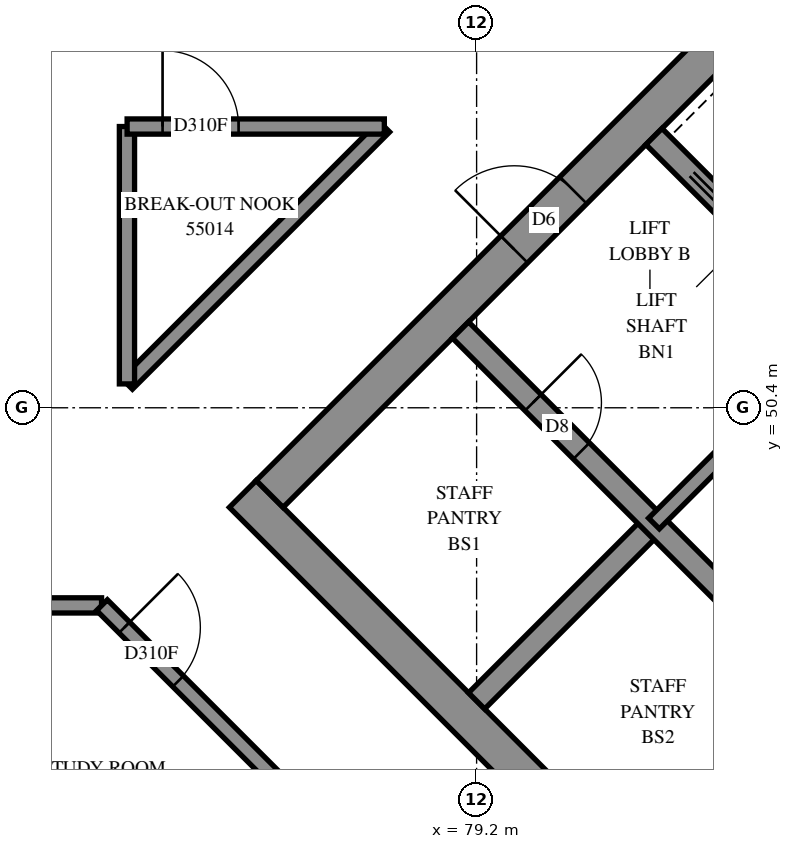
"""IFC4 building model, lengths in metres.
Left out: names, types, materials, properties, quantities, classifications, styles, units other than length and angle.
Written with IfcOpenShell. Run it as: python <this file> out.ifc"""

import sys

from ifc_helpers import new_model, si_unit, direction, frame, frame_2d, origin, place, context, subcontext, project, spatial, rectangle, extrude, element, fill, save


model = new_model("IFC4")
c1 = context("Model", 3, precision=1e-05, world=origin(), true_north=direction((0.0, 1.0)))
c2 = subcontext(c1, "Body", "Model", "MODEL_VIEW")
j1 = project(units=[si_unit("LENGTHUNIT", "METRE"), si_unit("PLANEANGLEUNIT", "RADIAN")], contexts=[c1])
p1 = place(None, origin())
s1 = spatial("IfcSite", under=j1, at=p1, CompositionType="ELEMENT")
p2 = place(p1, origin())
s2 = spatial("IfcBuilding", under=s1, at=p2, CompositionType="ELEMENT")
p3 = place(p2, frame((0.0, 0.0, 203.2)))
s3 = spatial("IfcBuildingStorey", under=s2, at=p3, CompositionType="ELEMENT", Elevation=203.2)
p4 = place(p3, frame((76.124, 49.267, -0.3), z_axis=(0.0, 0.0, 1.0), x_axis=(0.7071067812, -0.7071067812, 0.0)))
e1 = element("IfcWall", 1, at=p4, inside=s3, PredefinedType="SHEAR", context=c2, shape_type="SweptSolid", body=[
    extrude(rectangle(XDim=15.4, YDim=0.5, at=frame_2d((7.7, 0.0))), origin(), (0.0, 0.0, 1.0), 2.7),
])
p5 = place(p3, frame((76.478, 49.267, -0.3), z_axis=(0.0, 0.0, 1.0), x_axis=(0.7071067812, 0.7071067812, 0.0)))
e2 = element("IfcWall", 2, at=p5, inside=s3, PredefinedType="SHEAR", context=c2, shape_type="SweptSolid", body=[
    extrude(rectangle(XDim=14.4, YDim=0.5, at=frame_2d((7.2, 0.0))), origin(), (0.0, 0.0, 1.0), 2.7),
])
p6 = place(p5, frame((4.55, 0.0, 0.3)))
e3 = element("IfcOpeningElement", 3, at=p6, cuts=e2, PredefinedType="OPENING", context=c2, shape_type="SweptSolid", body=[
    extrude(rectangle(XDim=1.1, YDim=2.1, at=frame_2d((0.55, 1.05))), frame((0.0, 0.26, 0.0), z_axis=(0.0, -1.0, 0.0), x_axis=(1.0, 0.0, 0.0)), (0.0, 0.0, 1.0), 0.52),
])
p7 = place(p5, frame((11.35, 0.0, 0.3)))
e4 = element("IfcOpeningElement", 4, at=p7, cuts=e2, PredefinedType="OPENING", context=c2, shape_type="SweptSolid", body=[
    extrude(rectangle(XDim=1.1, YDim=2.1, at=frame_2d((0.55, 1.05))), frame((0.0, 0.26, 0.0), z_axis=(0.0, -1.0, 0.0), x_axis=(1.0, 0.0, 0.0)), (0.0, 0.0, 1.0), 0.52),
])
p8 = place(p3, frame((79.2, 46.544, 0.0), z_axis=(0.0, 0.0, 1.0), x_axis=(0.7071219326, 0.7070916295, 0.0)))
e5 = element("IfcWall", 5, at=p8, inside=s3, PredefinedType="SOLIDWALL", context=c2, shape_type="SweptSolid", body=[
    extrude(rectangle(XDim=3.3, YDim=0.3, at=frame_2d((1.65, 0.0))), origin(), (0.0, 0.0, 1.0), 3.1),
])
p9 = place(p3, frame((81.746, 43.999, 0.0), z_axis=(0.0, 0.0, 1.0), x_axis=(0.7071067812, 0.7071067812, 0.0)))
e6 = element("IfcWall", 6, at=p9, inside=s3, PredefinedType="SOLIDWALL", context=c2, shape_type="SweptSolid", body=[
    extrude(rectangle(XDim=3.3, YDim=0.3, at=frame_2d((1.65, 0.0))), origin(), (0.0, 0.0, 1.0), 3.1),
])
p10 = place(p3, frame((78.988, 51.423, 0.0), z_axis=(0.0, 0.0, 1.0), x_axis=(0.7071067812, -0.7071067812, 0.0)))
e7 = element("IfcWall", 7, at=p10, inside=s3, PredefinedType="SOLIDWALL", context=c2, shape_type="SweptSolid", body=[
    extrude(rectangle(XDim=14.4, YDim=0.3, at=frame_2d((7.2, 0.0))), origin(), (0.0, 0.0, 1.0), 3.1),
])
p11 = place(p10, frame((1.35, 0.0, 0.0)))
e8 = element("IfcOpeningElement", 8, at=p11, cuts=e7, PredefinedType="OPENING", context=c2, shape_type="SweptSolid", body=[
    extrude(rectangle(XDim=0.9, YDim=2.1, at=frame_2d((0.45, 1.05))), frame((0.0, 0.16, 0.0), z_axis=(0.0, -1.0, 0.0), x_axis=(1.0, 0.0, 0.0)), (0.0, 0.0, 1.0), 0.32),
])
p12 = place(p10, frame((4.95, 0.0, 0.0)))
e9 = element("IfcOpeningElement", 9, at=p12, cuts=e7, PredefinedType="OPENING", context=c2, shape_type="SweptSolid", body=[
    extrude(rectangle(XDim=0.9, YDim=2.1, at=frame_2d((0.45, 1.05))), frame((0.0, 0.16, 0.0), z_axis=(0.0, -1.0, 0.0), x_axis=(1.0, 0.0, 0.0)), (0.0, 0.0, 1.0), 0.32),
])
p13 = place(p10, frame((8.55, 0.0, 0.0)))
e10 = element("IfcOpeningElement", 10, at=p13, cuts=e7, PredefinedType="OPENING", context=c2, shape_type="SweptSolid", body=[
    extrude(rectangle(XDim=0.9, YDim=2.1, at=frame_2d((0.45, 1.05))), frame((0.0, 0.16, 0.0), z_axis=(0.0, -1.0, 0.0), x_axis=(1.0, 0.0, 0.0)), (0.0, 0.0, 1.0), 0.32),
])
p14 = place(p10, frame((12.05, 0.0, 0.0)))
e11 = element("IfcOpeningElement", 11, at=p14, cuts=e7, PredefinedType="OPENING", context=c2, shape_type="SweptSolid", body=[
    extrude(rectangle(XDim=1.1, YDim=2.1, at=frame_2d((0.55, 1.05))), frame((0.0, 0.16, 0.0), z_axis=(0.0, -1.0, 0.0), x_axis=(1.0, 0.0, 0.0)), (0.0, 0.0, 1.0), 0.32),
])
p15 = place(p3, frame((81.534, 53.969, 0.0), z_axis=(0.0, 0.0, 1.0), x_axis=(0.707103309, -0.7071102534, 0.0)))
e12 = element("IfcWall", 12, at=p15, inside=s3, PredefinedType="SOLIDWALL", context=c2, shape_type="SweptSolid", body=[
    extrude(rectangle(XDim=14.4, YDim=0.3, at=frame_2d((7.2, 0.0))), origin(), (0.0, 0.0, 1.0), 3.1),
])
p16 = place(p15, frame((1.25, 0.0, 0.0)))
e13 = element("IfcOpeningElement", 13, at=p16, cuts=e12, PredefinedType="OPENING", context=c2, shape_type="SweptSolid", body=[
    extrude(rectangle(XDim=1.1, YDim=2.1, at=frame_2d((0.55, 1.05))), frame((0.0, 0.16, 0.0), z_axis=(0.0, -1.0, 0.0), x_axis=(1.0, 0.0, 0.0)), (0.0, 0.0, 1.0), 0.32),
])
p17 = place(p15, frame((4.85, 0.0, 0.0)))
e14 = element("IfcOpeningElement", 14, at=p17, cuts=e12, PredefinedType="OPENING", context=c2, shape_type="SweptSolid", body=[
    extrude(rectangle(XDim=1.1, YDim=2.1, at=frame_2d((0.55, 1.05))), frame((0.0, 0.16, 0.0), z_axis=(0.0, -1.0, 0.0), x_axis=(1.0, 0.0, 0.0)), (0.0, 0.0, 1.0), 0.32),
])
p18 = place(p15, frame((8.45, 0.0, 0.0)))
e15 = element("IfcOpeningElement", 15, at=p18, cuts=e12, PredefinedType="OPENING", context=c2, shape_type="SweptSolid", body=[
    extrude(rectangle(XDim=1.1, YDim=2.1, at=frame_2d((0.55, 1.05))), frame((0.0, 0.16, 0.0), z_axis=(0.0, -1.0, 0.0), x_axis=(1.0, 0.0, 0.0)), (0.0, 0.0, 1.0), 0.32),
])
p19 = place(p15, frame((12.05, 0.0, 0.0)))
e16 = element("IfcOpeningElement", 16, at=p19, cuts=e12, PredefinedType="OPENING", context=c2, shape_type="SweptSolid", body=[
    extrude(rectangle(XDim=1.1, YDim=2.1, at=frame_2d((0.55, 1.05))), frame((0.0, 0.16, 0.0), z_axis=(0.0, -1.0, 0.0), x_axis=(1.0, 0.0, 0.0)), (0.0, 0.0, 1.0), 0.32),
])
p20 = place(p3, frame((81.534, 48.878, 0.0), z_axis=(0.0, 0.0, 1.0), x_axis=(0.707092892, 0.7071206701, 0.0)))
e17 = element("IfcWall", 17, at=p20, inside=s3, PredefinedType="PARTITIONING", context=c2, shape_type="SweptSolid", body=[
    extrude(rectangle(XDim=3.6, YDim=0.2, at=frame_2d((1.8, 0.0))), origin(), (0.0, 0.0, 1.0), 3.1),
])
p21 = place(p3, frame((55.0, 47.8, 0.0), z_axis=(0.0, 0.0, 1.0), x_axis=(1.0, 0.0, 0.0)))
e18 = element("IfcWall", 18, at=p21, inside=s3, PredefinedType="PARTITIONING", context=c2, shape_type="SweptSolid", body=[
    extrude(rectangle(XDim=19.266, YDim=0.2, at=frame_2d((9.633, 0.0))), origin(), (0.0, 0.0, 1.0), 3.1),
])
p22 = place(p21, frame((4.9, 0.0, 0.0)))
e19 = element("IfcOpeningElement", 19, at=p22, cuts=e18, PredefinedType="OPENING", context=c2, shape_type="SweptSolid", body=[
    extrude(rectangle(XDim=0.9, YDim=2.1, at=frame_2d((0.45, 1.05))), frame((0.0, 0.11, 0.0), z_axis=(0.0, -1.0, 0.0), x_axis=(1.0, 0.0, 0.0)), (0.0, 0.0, 1.0), 0.22),
])
p23 = place(p21, frame((6.6, 0.0, 0.0)))
e20 = element("IfcOpeningElement", 20, at=p23, cuts=e18, PredefinedType="OPENING", context=c2, shape_type="SweptSolid", body=[
    extrude(rectangle(XDim=0.9, YDim=2.1, at=frame_2d((0.45, 1.05))), frame((0.0, 0.11, 0.0), z_axis=(0.0, -1.0, 0.0), x_axis=(1.0, 0.0, 0.0)), (0.0, 0.0, 1.0), 0.22),
])
p24 = place(p21, frame((13.743, 0.0, 0.0)))
e21 = element("IfcOpeningElement", 21, at=p24, cuts=e18, PredefinedType="OPENING", context=c2, shape_type="SweptSolid", body=[
    extrude(rectangle(XDim=0.9, YDim=2.1, at=frame_2d((0.45, 1.05))), frame((0.0, 0.11, 0.0), z_axis=(0.0, -1.0, 0.0), x_axis=(1.0, 0.0, 0.0)), (0.0, 0.0, 1.0), 0.22),
])
p25 = place(p3, frame((74.601, 50.715, 0.0), z_axis=(0.0, 0.0, 1.0), x_axis=(0.7071067812, 0.7071067812, 0.0)))
e22 = element("IfcWall", 22, at=p25, inside=s3, PredefinedType="PARTITIONING", context=c2, shape_type="SweptSolid", body=[
    extrude(rectangle(XDim=4.786, YDim=0.2, at=frame_2d((2.393, 0.0))), origin(), (0.0, 0.0, 1.0), 3.1),
])
p26 = place(p3, frame((74.272, 47.803, 0.0), z_axis=(0.0, 0.0, 1.0), x_axis=(0.7071067812, -0.7071067812, 0.0)))
e23 = element("IfcWall", 23, at=p26, inside=s3, PredefinedType="PARTITIONING", context=c2, shape_type="SweptSolid", body=[
    extrude(rectangle(XDim=4.641, YDim=0.2, at=frame_2d((2.321, 0.0))), origin(), (0.0, 0.0, 1.0), 3.1),
])
p27 = place(p26, frame((0.416, 0.0, 0.0)))
e24 = element("IfcOpeningElement", 24, at=p27, cuts=e23, PredefinedType="OPENING", context=c2, shape_type="SweptSolid", body=[
    extrude(rectangle(XDim=1.0, YDim=2.1, at=frame_2d((0.5, 1.05))), frame((0.0, 0.11, 0.0), z_axis=(0.0, -1.0, 0.0), x_axis=(1.0, 0.0, 0.0)), (0.0, 0.0, 1.0), 0.22),
])
p28 = place(p3, frame((74.6, 50.714, 0.0), z_axis=(0.0, 0.0, 1.0), x_axis=(0.0, 1.0, 0.0)))
e25 = element("IfcWall", 25, at=p28, inside=s3, PredefinedType="PARTITIONING", context=c2, shape_type="SweptSolid", body=[
    extrude(rectangle(XDim=3.386, YDim=0.2, at=frame_2d((1.693, 0.0))), origin(), (0.0, 0.0, 1.0), 3.1),
])
p29 = place(p3, frame((74.602, 54.1, 0.0), z_axis=(0.0, 0.0, 1.0), x_axis=(1.0, 0.0, 0.0)))
e26 = element("IfcWall", 26, at=p29, inside=s3, PredefinedType="PARTITIONING", context=c2, shape_type="SweptSolid", body=[
    extrude(rectangle(XDim=3.384, YDim=0.2, at=frame_2d((1.692, 0.0))), origin(), (0.0, 0.0, 1.0), 3.1),
])
p30 = place(p29, frame((0.467, 0.0, 0.0)))
e27 = element("IfcOpeningElement", 27, at=p30, cuts=e26, PredefinedType="OPENING", context=c2, shape_type="SweptSolid", body=[
    extrude(rectangle(XDim=1.0, YDim=2.1, at=frame_2d((0.5, 1.05))), frame((0.0, 0.11, 0.0), z_axis=(0.0, -1.0, 0.0), x_axis=(1.0, 0.0, 0.0)), (0.0, 0.0, 1.0), 0.22),
])
p31 = place(p6, origin())
e28 = element("IfcDoor", 28, at=p31, inside=s3, OperationType="DOUBLE_DOOR_SINGLE_SWING", PredefinedType="DOOR", context=c2, shape_type="SweptSolid", body=[
    extrude(rectangle(XDim=1.1, YDim=2.1, at=frame_2d((0.55, 1.05))), frame((0.0, 0.025, 0.0), z_axis=(0.0, -1.0, 0.0), x_axis=(1.0, 0.0, 0.0)), (0.0, 0.0, 1.0), 0.05),
])
fill(e3, e28)
p32 = place(p11, origin())
e29 = element("IfcDoor", 29, at=p32, inside=s3, OperationType="SINGLE_SWING_LEFT", PredefinedType="DOOR", context=c2, shape_type="SweptSolid", body=[
    extrude(rectangle(XDim=0.9, YDim=2.1, at=frame_2d((0.45, 1.05))), frame((0.0, 0.025, 0.0), z_axis=(0.0, -1.0, 0.0), x_axis=(1.0, 0.0, 0.0)), (0.0, 0.0, 1.0), 0.05),
])
fill(e8, e29)
p33 = place(p30, origin())
e30 = element("IfcDoor", 30, at=p33, inside=s3, OperationType="SINGLE_SWING_RIGHT", PredefinedType="DOOR", context=c2, shape_type="SweptSolid", body=[
    extrude(rectangle(XDim=1.0, YDim=2.1, at=frame_2d((0.5, 1.05))), frame((0.0, 0.025, 0.0), z_axis=(0.0, -1.0, 0.0), x_axis=(1.0, 0.0, 0.0)), (0.0, 0.0, 1.0), 0.05),
])
fill(e27, e30)
p34 = place(p27, origin())
e31 = element("IfcDoor", 31, at=p34, inside=s3, OperationType="SINGLE_SWING_LEFT", PredefinedType="DOOR", context=c2, shape_type="SweptSolid", body=[
    extrude(rectangle(XDim=1.0, YDim=2.1, at=frame_2d((0.5, 1.05))), frame((0.0, 0.025, 0.0), z_axis=(0.0, -1.0, 0.0), x_axis=(1.0, 0.0, 0.0)), (0.0, 0.0, 1.0), 0.05),
])
fill(e24, e31)
save(model, sys.argv[1])
